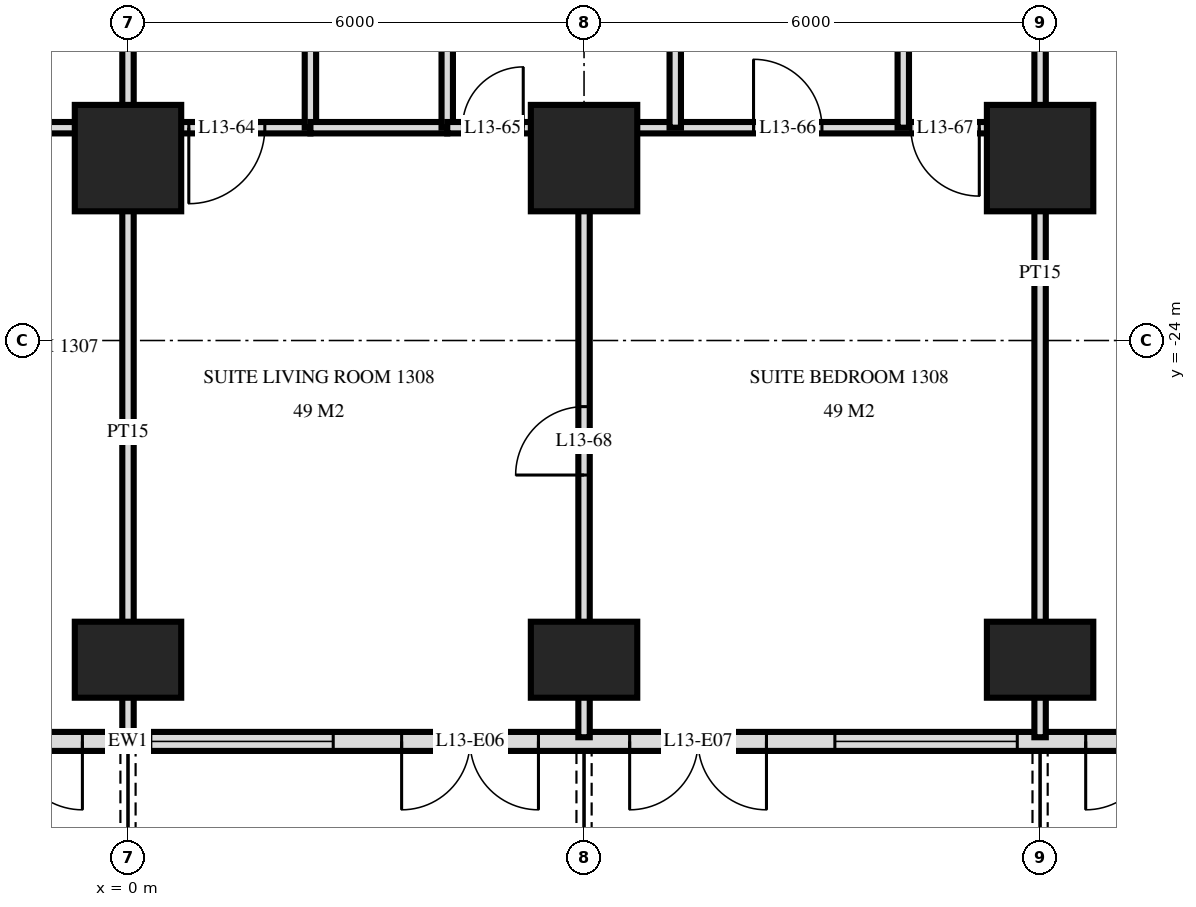
"""IFC4 building model, lengths in metres.
Left out: names, types, materials, properties, quantities, classifications, styles, units other than length and angle.
Written with IfcOpenShell. Run it as: python <this file> out.ifc"""

import sys

from ifc_helpers import new_model, si_unit, direction, frame, frame_2d, origin, origin_2d, place, context, subcontext, project, spatial, rectangle, extrude, element, fill, save


model = new_model("IFC4")
c1 = context("Model", 3, precision=1e-05, world=origin(), true_north=direction((0.0, 1.0)))
c2 = subcontext(c1, "Body", "Model", "MODEL_VIEW")
j1 = project(units=[si_unit("LENGTHUNIT", "METRE"), si_unit("PLANEANGLEUNIT", "RADIAN")], contexts=[c1])
p1 = place(None, origin())
s1 = spatial("IfcSite", under=j1, at=p1, CompositionType="ELEMENT")
p2 = place(p1, origin())
s2 = spatial("IfcBuilding", under=s1, at=p2, CompositionType="ELEMENT")
p3 = place(p2, frame((0.0, 0.0, 56.4)))
s3 = spatial("IfcBuildingStorey", under=s2, at=p3, CompositionType="ELEMENT", Elevation=56.4)
p4 = place(p3, frame((0.0, -28.2, 0.0), z_axis=(0.0, 0.0, 1.0), x_axis=(1.0, 0.0, 0.0)))
e1 = element("IfcColumn", 1, at=p4, inside=s3, PredefinedType="COLUMN", context=c2, shape_type="SweptSolid", body=[
    extrude(rectangle(XDim=1.4, YDim=1.0, at=origin_2d()), origin(), (0.0, 0.0, 1.0), 3.6),
])
p5 = place(p3, frame((0.0, -21.6, 0.0), z_axis=(0.0, 0.0, 1.0), x_axis=(1.0, 0.0, 0.0)))
e2 = element("IfcColumn", 2, at=p5, inside=s3, PredefinedType="COLUMN", context=c2, shape_type="SweptSolid", body=[
    extrude(rectangle(XDim=1.4, YDim=1.4, at=origin_2d()), origin(), (0.0, 0.0, 1.0), 3.6),
])
p6 = place(p3, frame((6.0, -28.2, 0.0), z_axis=(0.0, 0.0, 1.0), x_axis=(1.0, 0.0, 0.0)))
e3 = element("IfcColumn", 3, at=p6, inside=s3, PredefinedType="COLUMN", context=c2, shape_type="SweptSolid", body=[
    extrude(rectangle(XDim=1.4, YDim=1.0, at=origin_2d()), origin(), (0.0, 0.0, 1.0), 3.6),
])
p7 = place(p3, frame((6.0, -21.6, 0.0), z_axis=(0.0, 0.0, 1.0), x_axis=(1.0, 0.0, 0.0)))
e4 = element("IfcColumn", 4, at=p7, inside=s3, PredefinedType="COLUMN", context=c2, shape_type="SweptSolid", body=[
    extrude(rectangle(XDim=1.4, YDim=1.4, at=origin_2d()), origin(), (0.0, 0.0, 1.0), 3.6),
])
p8 = place(p3, frame((12.0, -28.2, 0.0), z_axis=(0.0, 0.0, 1.0), x_axis=(1.0, 0.0, 0.0)))
e5 = element("IfcColumn", 5, at=p8, inside=s3, PredefinedType="COLUMN", context=c2, shape_type="SweptSolid", body=[
    extrude(rectangle(XDim=1.4, YDim=1.0, at=origin_2d()), origin(), (0.0, 0.0, 1.0), 3.6),
])
p9 = place(p3, frame((12.0, -21.6, 0.0), z_axis=(0.0, 0.0, 1.0), x_axis=(1.0, 0.0, 0.0)))
e6 = element("IfcColumn", 6, at=p9, inside=s3, PredefinedType="COLUMN", context=c2, shape_type="SweptSolid", body=[
    extrude(rectangle(XDim=1.4, YDim=1.4, at=origin_2d()), origin(), (0.0, 0.0, 1.0), 3.6),
])
p10 = place(p3, frame((-28.775, -29.275, 0.0), z_axis=(0.0, 0.0, 1.0), x_axis=(1.0, 0.0, 0.0)))
e7 = element("IfcWall", 7, at=p10, inside=s3, PredefinedType="SOLIDWALL", context=c2, shape_type="SweptSolid", body=[
    extrude(rectangle(XDim=57.551, YDim=0.25, at=frame_2d((28.775, 0.0))), origin(), (0.0, 0.0, 1.0), 3.32),
])
p11 = place(p10, frame((0.575, 0.0, 0.0)))
e8 = element("IfcOpeningElement", 8, at=p11, cuts=e7, PredefinedType="OPENING", context=c2, shape_type="SweptSolid", body=[
    extrude(rectangle(XDim=1.8, YDim=2.4, at=frame_2d((0.9, 1.2))), frame((0.0, 0.135, 0.0), z_axis=(0.0, -1.0, 0.0), x_axis=(1.0, 0.0, 0.0)), (0.0, 0.0, 1.0), 0.27),
])
p12 = place(p10, frame((5.375, 0.0, 0.0)))
e9 = element("IfcOpeningElement", 9, at=p12, cuts=e7, PredefinedType="OPENING", context=c2, shape_type="SweptSolid", body=[
    extrude(rectangle(XDim=1.8, YDim=2.4, at=frame_2d((0.9, 1.2))), frame((0.0, 0.135, 0.0), z_axis=(0.0, -1.0, 0.0), x_axis=(1.0, 0.0, 0.0)), (0.0, 0.0, 1.0), 0.27),
])
p13 = place(p10, frame((8.075, 0.0, 0.3)))
e10 = element("IfcOpeningElement", 10, at=p13, cuts=e7, PredefinedType="OPENING", context=c2, shape_type="SweptSolid", body=[
    extrude(rectangle(XDim=2.4, YDim=2.1, at=frame_2d((1.2, 1.05))), frame((0.0, 0.135, 0.0), z_axis=(0.0, -1.0, 0.0), x_axis=(1.0, 0.0, 0.0)), (0.0, 0.0, 1.0), 0.27),
])
p14 = place(p10, frame((11.375, 0.0, 0.0)))
e11 = element("IfcOpeningElement", 11, at=p14, cuts=e7, PredefinedType="OPENING", context=c2, shape_type="SweptSolid", body=[
    extrude(rectangle(XDim=1.8, YDim=2.4, at=frame_2d((0.9, 1.2))), frame((0.0, 0.135, 0.0), z_axis=(0.0, -1.0, 0.0), x_axis=(1.0, 0.0, 0.0)), (0.0, 0.0, 1.0), 0.27),
])
p15 = place(p10, frame((14.075, 0.0, 0.3)))
e12 = element("IfcOpeningElement", 12, at=p15, cuts=e7, PredefinedType="OPENING", context=c2, shape_type="SweptSolid", body=[
    extrude(rectangle(XDim=2.4, YDim=2.1, at=frame_2d((1.2, 1.05))), frame((0.0, 0.135, 0.0), z_axis=(0.0, -1.0, 0.0), x_axis=(1.0, 0.0, 0.0)), (0.0, 0.0, 1.0), 0.27),
])
p16 = place(p10, frame((17.375, 0.0, 0.0)))
e13 = element("IfcOpeningElement", 13, at=p16, cuts=e7, PredefinedType="OPENING", context=c2, shape_type="SweptSolid", body=[
    extrude(rectangle(XDim=1.8, YDim=2.4, at=frame_2d((0.9, 1.2))), frame((0.0, 0.135, 0.0), z_axis=(0.0, -1.0, 0.0), x_axis=(1.0, 0.0, 0.0)), (0.0, 0.0, 1.0), 0.27),
])
p17 = place(p10, frame((20.075, 0.0, 0.3)))
e14 = element("IfcOpeningElement", 14, at=p17, cuts=e7, PredefinedType="OPENING", context=c2, shape_type="SweptSolid", body=[
    extrude(rectangle(XDim=2.4, YDim=2.1, at=frame_2d((1.2, 1.05))), frame((0.0, 0.135, 0.0), z_axis=(0.0, -1.0, 0.0), x_axis=(1.0, 0.0, 0.0)), (0.0, 0.0, 1.0), 0.27),
])
p18 = place(p10, frame((23.075, 0.0, 0.3)))
e15 = element("IfcOpeningElement", 15, at=p18, cuts=e7, PredefinedType="OPENING", context=c2, shape_type="SweptSolid", body=[
    extrude(rectangle(XDim=2.4, YDim=2.1, at=frame_2d((1.2, 1.05))), frame((0.0, 0.135, 0.0), z_axis=(0.0, -1.0, 0.0), x_axis=(1.0, 0.0, 0.0)), (0.0, 0.0, 1.0), 0.27),
])
p19 = place(p10, frame((26.375, 0.0, 0.0)))
e16 = element("IfcOpeningElement", 16, at=p19, cuts=e7, PredefinedType="OPENING", context=c2, shape_type="SweptSolid", body=[
    extrude(rectangle(XDim=1.8, YDim=2.4, at=frame_2d((0.9, 1.2))), frame((0.0, 0.135, 0.0), z_axis=(0.0, -1.0, 0.0), x_axis=(1.0, 0.0, 0.0)), (0.0, 0.0, 1.0), 0.27),
])
p20 = place(p10, frame((29.075, 0.0, 0.3)))
e17 = element("IfcOpeningElement", 17, at=p20, cuts=e7, PredefinedType="OPENING", context=c2, shape_type="SweptSolid", body=[
    extrude(rectangle(XDim=2.4, YDim=2.1, at=frame_2d((1.2, 1.05))), frame((0.0, 0.135, 0.0), z_axis=(0.0, -1.0, 0.0), x_axis=(1.0, 0.0, 0.0)), (0.0, 0.0, 1.0), 0.27),
])
p21 = place(p10, frame((32.375, 0.0, 0.0)))
e18 = element("IfcOpeningElement", 18, at=p21, cuts=e7, PredefinedType="OPENING", context=c2, shape_type="SweptSolid", body=[
    extrude(rectangle(XDim=1.8, YDim=2.4, at=frame_2d((0.9, 1.2))), frame((0.0, 0.135, 0.0), z_axis=(0.0, -1.0, 0.0), x_axis=(1.0, 0.0, 0.0)), (0.0, 0.0, 1.0), 0.27),
])
p22 = place(p10, frame((35.375, 0.0, 0.0)))
e19 = element("IfcOpeningElement", 19, at=p22, cuts=e7, PredefinedType="OPENING", context=c2, shape_type="SweptSolid", body=[
    extrude(rectangle(XDim=1.8, YDim=2.4, at=frame_2d((0.9, 1.2))), frame((0.0, 0.135, 0.0), z_axis=(0.0, -1.0, 0.0), x_axis=(1.0, 0.0, 0.0)), (0.0, 0.0, 1.0), 0.27),
])
p23 = place(p10, frame((38.075, 0.0, 0.3)))
e20 = element("IfcOpeningElement", 20, at=p23, cuts=e7, PredefinedType="OPENING", context=c2, shape_type="SweptSolid", body=[
    extrude(rectangle(XDim=2.4, YDim=2.1, at=frame_2d((1.2, 1.05))), frame((0.0, 0.135, 0.0), z_axis=(0.0, -1.0, 0.0), x_axis=(1.0, 0.0, 0.0)), (0.0, 0.0, 1.0), 0.27),
])
p24 = place(p10, frame((41.375, 0.0, 0.0)))
e21 = element("IfcOpeningElement", 21, at=p24, cuts=e7, PredefinedType="OPENING", context=c2, shape_type="SweptSolid", body=[
    extrude(rectangle(XDim=1.8, YDim=2.4, at=frame_2d((0.9, 1.2))), frame((0.0, 0.135, 0.0), z_axis=(0.0, -1.0, 0.0), x_axis=(1.0, 0.0, 0.0)), (0.0, 0.0, 1.0), 0.27),
])
p25 = place(p10, frame((44.075, 0.0, 0.3)))
e22 = element("IfcOpeningElement", 22, at=p25, cuts=e7, PredefinedType="OPENING", context=c2, shape_type="SweptSolid", body=[
    extrude(rectangle(XDim=2.4, YDim=2.1, at=frame_2d((1.2, 1.05))), frame((0.0, 0.135, 0.0), z_axis=(0.0, -1.0, 0.0), x_axis=(1.0, 0.0, 0.0)), (0.0, 0.0, 1.0), 0.27),
])
p26 = place(p10, frame((47.075, 0.0, 0.3)))
e23 = element("IfcOpeningElement", 23, at=p26, cuts=e7, PredefinedType="OPENING", context=c2, shape_type="SweptSolid", body=[
    extrude(rectangle(XDim=2.4, YDim=2.1, at=frame_2d((1.2, 1.05))), frame((0.0, 0.135, 0.0), z_axis=(0.0, -1.0, 0.0), x_axis=(1.0, 0.0, 0.0)), (0.0, 0.0, 1.0), 0.27),
])
p27 = place(p10, frame((50.375, 0.0, 0.0)))
e24 = element("IfcOpeningElement", 24, at=p27, cuts=e7, PredefinedType="OPENING", context=c2, shape_type="SweptSolid", body=[
    extrude(rectangle(XDim=1.8, YDim=2.4, at=frame_2d((0.9, 1.2))), frame((0.0, 0.135, 0.0), z_axis=(0.0, -1.0, 0.0), x_axis=(1.0, 0.0, 0.0)), (0.0, 0.0, 1.0), 0.27),
])
p28 = place(p10, frame((53.375, 0.0, 0.0)))
e25 = element("IfcOpeningElement", 25, at=p28, cuts=e7, PredefinedType="OPENING", context=c2, shape_type="SweptSolid", body=[
    extrude(rectangle(XDim=1.8, YDim=2.4, at=frame_2d((0.9, 1.2))), frame((0.0, 0.135, 0.0), z_axis=(0.0, -1.0, 0.0), x_axis=(1.0, 0.0, 0.0)), (0.0, 0.0, 1.0), 0.27),
])
p29 = place(p3, frame((12.0, -29.22, 0.0), z_axis=(0.0, 0.0, 1.0), x_axis=(0.0, 1.0, 0.0)))
e26 = element("IfcWall", 26, at=p29, inside=s3, PredefinedType="PARTITIONING", context=c2, shape_type="SweptSolid", body=[
    extrude(rectangle(XDim=12.22, YDim=0.15, at=frame_2d((6.11, 0.0))), origin(), (0.0, 0.0, 1.0), 3.32),
])
for number, where, z_axis, x_axis in (
    (27, (10.2, -21.2, 0.0), (0.0, 0.0, 1.0), (0.0, 1.0, 0.0)),
    (28, (7.2, -21.2, 0.0), (0.0, 0.0, 1.0), (0.0, 1.0, 0.0)),
):
    element("IfcWall", number, at=place(p3, frame(where, z_axis=z_axis, x_axis=x_axis)), inside=s3, PredefinedType="PARTITIONING", context=c2, shape_type="SweptSolid", body=[
        extrude(rectangle(XDim=4.2, YDim=0.15, at=frame_2d((2.1, 0.0))), origin(), (0.0, 0.0, 1.0), 3.32),
    ])
p30 = place(p3, frame((6.0, -29.22, 0.0), z_axis=(0.0, 0.0, 1.0), x_axis=(0.0, 1.0, 0.0)))
e29 = element("IfcWall", 29, at=p30, inside=s3, PredefinedType="PARTITIONING", context=c2, shape_type="SweptSolid", body=[
    extrude(rectangle(XDim=8.02, YDim=0.15, at=frame_2d((4.01, 0.0))), origin(), (0.0, 0.0, 1.0), 3.32),
])
p31 = place(p30, frame((3.45, 0.0, 0.0)))
e30 = element("IfcOpeningElement", 30, at=p31, cuts=e29, PredefinedType="OPENING", context=c2, shape_type="SweptSolid", body=[
    extrude(rectangle(XDim=0.9, YDim=2.1, at=frame_2d((0.45, 1.05))), frame((0.0, 0.085, 0.0), z_axis=(0.0, -1.0, 0.0), x_axis=(1.0, 0.0, 0.0)), (0.0, 0.0, 1.0), 0.17),
])
p32 = place(p3, frame((4.2, -21.2, 0.0), z_axis=(0.0, 0.0, 1.0), x_axis=(0.0, 1.0, 0.0)))
e31 = element("IfcWall", 31, at=p32, inside=s3, PredefinedType="PLUMBINGWALL", context=c2, shape_type="SweptSolid", body=[
    extrude(rectangle(XDim=4.2, YDim=0.15, at=frame_2d((2.1, 0.0))), origin(), (0.0, 0.0, 1.0), 3.32),
])
p33 = place(p3, frame((2.4, -21.2, 0.0), z_axis=(0.0, 0.0, 1.0), x_axis=(0.0, 1.0, 0.0)))
e32 = element("IfcWall", 32, at=p33, inside=s3, PredefinedType="PARTITIONING", context=c2, shape_type="SweptSolid", body=[
    extrude(rectangle(XDim=4.2, YDim=0.15, at=frame_2d((2.1, 0.0))), origin(), (0.0, 0.0, 1.0), 3.32),
])
p34 = place(p33, frame((1.6, 0.0, 0.0)))
e33 = element("IfcOpeningElement", 33, at=p34, cuts=e32, PredefinedType="OPENING", context=c2, shape_type="SweptSolid", body=[
    extrude(rectangle(XDim=1.0, YDim=2.1, at=frame_2d((0.5, 1.05))), frame((0.0, 0.085, 0.0), z_axis=(0.0, -1.0, 0.0), x_axis=(1.0, 0.0, 0.0)), (0.0, 0.0, 1.0), 0.17),
])
p35 = place(p3, frame((0.0, -21.2, 0.0), z_axis=(0.0, 0.0, 1.0), x_axis=(0.0, 1.0, 0.0)))
e34 = element("IfcWall", 34, at=p35, inside=s3, PredefinedType="PARTITIONING", context=c2, shape_type="SweptSolid", body=[
    extrude(rectangle(XDim=4.2, YDim=0.15, at=frame_2d((2.1, 0.0))), origin(), (0.0, 0.0, 1.0), 3.32),
])
p36 = place(p3, frame((0.0, -29.22, 0.0), z_axis=(0.0, 0.0, 1.0), x_axis=(0.0, 1.0, 0.0)))
e35 = element("IfcWall", 35, at=p36, inside=s3, PredefinedType="PARTITIONING", context=c2, shape_type="SweptSolid", body=[
    extrude(rectangle(XDim=8.02, YDim=0.15, at=frame_2d((4.01, 0.0))), origin(), (0.0, 0.0, 1.0), 3.32),
])
p37 = place(p3, frame((0.0, -21.2, 0.0), z_axis=(0.0, 0.0, 1.0), x_axis=(1.0, 0.0, 0.0)))
e36 = element("IfcWall", 36, at=p37, inside=s3, PredefinedType="PARTITIONING", context=c2, shape_type="SweptSolid", body=[
    extrude(rectangle(XDim=2.4, YDim=0.15, at=frame_2d((1.2, 0.0))), origin(), (0.0, 0.0, 1.0), 3.32),
])
p38 = place(p37, frame((0.8, 0.0, 0.0)))
e37 = element("IfcOpeningElement", 37, at=p38, cuts=e36, PredefinedType="OPENING", context=c2, shape_type="SweptSolid", body=[
    extrude(rectangle(XDim=1.0, YDim=2.1, at=frame_2d((0.5, 1.05))), frame((0.0, 0.085, 0.0), z_axis=(0.0, -1.0, 0.0), x_axis=(1.0, 0.0, 0.0)), (0.0, 0.0, 1.0), 0.17),
])
p39 = place(p3, frame((-1.7, -21.2, 0.0), z_axis=(0.0, 0.0, 1.0), x_axis=(1.0, 0.0, 0.0)))
e38 = element("IfcWall", 38, at=p39, inside=s3, PredefinedType="PARTITIONING", context=c2, shape_type="SweptSolid", body=[
    extrude(rectangle(XDim=1.7, YDim=0.15, at=frame_2d((0.85, 0.0))), origin(), (0.0, 0.0, 1.0), 3.32),
])
p40 = place(p3, frame((4.2, -21.2, 0.0), z_axis=(0.0, 0.0, 1.0), x_axis=(1.0, 0.0, 0.0)))
e39 = element("IfcWall", 39, at=p40, inside=s3, PredefinedType="PARTITIONING", context=c2, shape_type="SweptSolid", body=[
    extrude(rectangle(XDim=7.8, YDim=0.15, at=frame_2d((3.9, 0.0))), origin(), (0.0, 0.0, 1.0), 3.32),
])
p41 = place(p40, frame((0.2, 0.0, 0.0)))
e40 = element("IfcOpeningElement", 40, at=p41, cuts=e39, PredefinedType="OPENING", context=c2, shape_type="SweptSolid", body=[
    extrude(rectangle(XDim=0.8, YDim=2.1, at=frame_2d((0.4, 1.05))), frame((0.0, 0.085, 0.0), z_axis=(0.0, -1.0, 0.0), x_axis=(1.0, 0.0, 0.0)), (0.0, 0.0, 1.0), 0.17),
])
p42 = place(p40, frame((4.03, 0.0, 0.0)))
e41 = element("IfcOpeningElement", 41, at=p42, cuts=e39, PredefinedType="OPENING", context=c2, shape_type="SweptSolid", body=[
    extrude(rectangle(XDim=0.9, YDim=2.1, at=frame_2d((0.45, 1.05))), frame((0.0, 0.085, 0.0), z_axis=(0.0, -1.0, 0.0), x_axis=(1.0, 0.0, 0.0)), (0.0, 0.0, 1.0), 0.17),
])
p43 = place(p40, frame((6.1, 0.0, 0.0)))
e42 = element("IfcOpeningElement", 42, at=p43, cuts=e39, PredefinedType="OPENING", context=c2, shape_type="SweptSolid", body=[
    extrude(rectangle(XDim=0.9, YDim=2.1, at=frame_2d((0.45, 1.05))), frame((0.0, 0.085, 0.0), z_axis=(0.0, -1.0, 0.0), x_axis=(1.0, 0.0, 0.0)), (0.0, 0.0, 1.0), 0.17),
])
p44 = place(p3, frame((2.4, -21.2, 0.0), z_axis=(0.0, 0.0, 1.0), x_axis=(1.0, 0.0, 0.0)))
e43 = element("IfcWall", 43, at=p44, inside=s3, PredefinedType="PLUMBINGWALL", context=c2, shape_type="SweptSolid", body=[
    extrude(rectangle(XDim=1.8, YDim=0.15, at=frame_2d((0.9, 0.0))), origin(), (0.0, 0.0, 1.0), 3.32),
])
p45 = place(p19, frame((0.9, 0.0, 0.0), z_axis=(0.0, 0.0, 1.0), x_axis=(-1.0, 0.0, 0.0)))
e44 = element("IfcDoor", 44, at=p45, inside=s3, OperationType="DOUBLE_DOOR_SINGLE_SWING", PredefinedType="DOOR", context=c2, shape_type="SweptSolid", body=[
    extrude(rectangle(XDim=1.8, YDim=2.4, at=frame_2d((0.0, 1.2))), frame((0.0, -0.025, 0.0), z_axis=(0.0, 1.0, 0.0), x_axis=(-1.0, 0.0, 0.0)), (0.0, 0.0, 1.0), 0.05),
])
fill(e16, e44)
p46 = place(p20, origin())
e45 = element("IfcWindow", 45, at=p46, inside=s3, PartitioningType="SINGLE_PANEL", PredefinedType="WINDOW", context=c2, shape_type="SweptSolid", body=[
    extrude(rectangle(XDim=2.4, YDim=2.1, at=frame_2d((1.2, 1.05))), frame((0.0, 0.03, 0.0), z_axis=(0.0, -1.0, 0.0), x_axis=(1.0, 0.0, 0.0)), (0.0, 0.0, 1.0), 0.06),
])
fill(e17, e45)
p47 = place(p21, frame((0.9, 0.0, 0.0), z_axis=(0.0, 0.0, 1.0), x_axis=(-1.0, 0.0, 0.0)))
e46 = element("IfcDoor", 46, at=p47, inside=s3, OperationType="DOUBLE_DOOR_SINGLE_SWING", PredefinedType="DOOR", context=c2, shape_type="SweptSolid", body=[
    extrude(rectangle(XDim=1.8, YDim=2.4, at=frame_2d((0.0, 1.2))), frame((0.0, -0.025, 0.0), z_axis=(0.0, 1.0, 0.0), x_axis=(-1.0, 0.0, 0.0)), (0.0, 0.0, 1.0), 0.05),
])
fill(e18, e46)
p48 = place(p22, frame((0.9, 0.0, 0.0), z_axis=(0.0, 0.0, 1.0), x_axis=(-1.0, 0.0, 0.0)))
e47 = element("IfcDoor", 47, at=p48, inside=s3, OperationType="DOUBLE_DOOR_SINGLE_SWING", PredefinedType="DOOR", context=c2, shape_type="SweptSolid", body=[
    extrude(rectangle(XDim=1.8, YDim=2.4, at=frame_2d((0.0, 1.2))), frame((0.0, -0.025, 0.0), z_axis=(0.0, 1.0, 0.0), x_axis=(-1.0, 0.0, 0.0)), (0.0, 0.0, 1.0), 0.05),
])
fill(e19, e47)
p49 = place(p23, origin())
e48 = element("IfcWindow", 48, at=p49, inside=s3, PartitioningType="SINGLE_PANEL", PredefinedType="WINDOW", context=c2, shape_type="SweptSolid", body=[
    extrude(rectangle(XDim=2.4, YDim=2.1, at=frame_2d((1.2, 1.05))), frame((0.0, 0.03, 0.0), z_axis=(0.0, -1.0, 0.0), x_axis=(1.0, 0.0, 0.0)), (0.0, 0.0, 1.0), 0.06),
])
fill(e20, e48)
p50 = place(p24, frame((0.9, 0.0, 0.0), z_axis=(0.0, 0.0, 1.0), x_axis=(-1.0, 0.0, 0.0)))
e49 = element("IfcDoor", 49, at=p50, inside=s3, OperationType="DOUBLE_DOOR_SINGLE_SWING", PredefinedType="DOOR", context=c2, shape_type="SweptSolid", body=[
    extrude(rectangle(XDim=1.8, YDim=2.4, at=frame_2d((0.0, 1.2))), frame((0.0, -0.025, 0.0), z_axis=(0.0, 1.0, 0.0), x_axis=(-1.0, 0.0, 0.0)), (0.0, 0.0, 1.0), 0.05),
])
fill(e21, e49)
p51 = place(p38, frame((0.5, 0.0, 0.0), z_axis=(0.0, 0.0, 1.0), x_axis=(-1.0, 0.0, 0.0)))
e50 = element("IfcDoor", 50, at=p51, inside=s3, OperationType="SINGLE_SWING_LEFT", PredefinedType="DOOR", context=c2, shape_type="SweptSolid", body=[
    extrude(rectangle(XDim=1.0, YDim=2.1, at=frame_2d((0.0, 1.05))), frame((0.0, -0.025, 0.0), z_axis=(0.0, 1.0, 0.0), x_axis=(-1.0, 0.0, 0.0)), (0.0, 0.0, 1.0), 0.05),
])
fill(e37, e50)
p52 = place(p41, origin())
e51 = element("IfcDoor", 51, at=p52, inside=s3, OperationType="SINGLE_SWING_LEFT", PredefinedType="DOOR", context=c2, shape_type="SweptSolid", body=[
    extrude(rectangle(XDim=0.8, YDim=2.1, at=frame_2d((0.4, 1.05))), frame((0.0, 0.025, 0.0), z_axis=(0.0, -1.0, 0.0), x_axis=(1.0, 0.0, 0.0)), (0.0, 0.0, 1.0), 0.05),
])
fill(e40, e51)
p53 = place(p42, origin())
e52 = element("IfcDoor", 52, at=p53, inside=s3, OperationType="SINGLE_SWING_RIGHT", PredefinedType="DOOR", context=c2, shape_type="SweptSolid", body=[
    extrude(rectangle(XDim=0.9, YDim=2.1, at=frame_2d((0.45, 1.05))), frame((0.0, 0.025, 0.0), z_axis=(0.0, -1.0, 0.0), x_axis=(1.0, 0.0, 0.0)), (0.0, 0.0, 1.0), 0.05),
])
fill(e41, e52)
p54 = place(p43, frame((0.45, 0.0, 0.0), z_axis=(0.0, 0.0, 1.0), x_axis=(-1.0, 0.0, 0.0)))
e53 = element("IfcDoor", 53, at=p54, inside=s3, OperationType="SINGLE_SWING_RIGHT", PredefinedType="DOOR", context=c2, shape_type="SweptSolid", body=[
    extrude(rectangle(XDim=0.9, YDim=2.1, at=frame_2d((0.0, 1.05))), frame((0.0, -0.025, 0.0), z_axis=(0.0, 1.0, 0.0), x_axis=(-1.0, 0.0, 0.0)), (0.0, 0.0, 1.0), 0.05),
])
fill(e42, e53)
p55 = place(p31, origin())
e54 = element("IfcDoor", 54, at=p55, inside=s3, OperationType="SINGLE_SWING_RIGHT", PredefinedType="DOOR", context=c2, shape_type="SweptSolid", body=[
    extrude(rectangle(XDim=0.9, YDim=2.1, at=frame_2d((0.45, 1.05))), frame((0.0, 0.025, 0.0), z_axis=(0.0, -1.0, 0.0), x_axis=(1.0, 0.0, 0.0)), (0.0, 0.0, 1.0), 0.05),
])
fill(e30, e54)
save(model, sys.argv[1])
